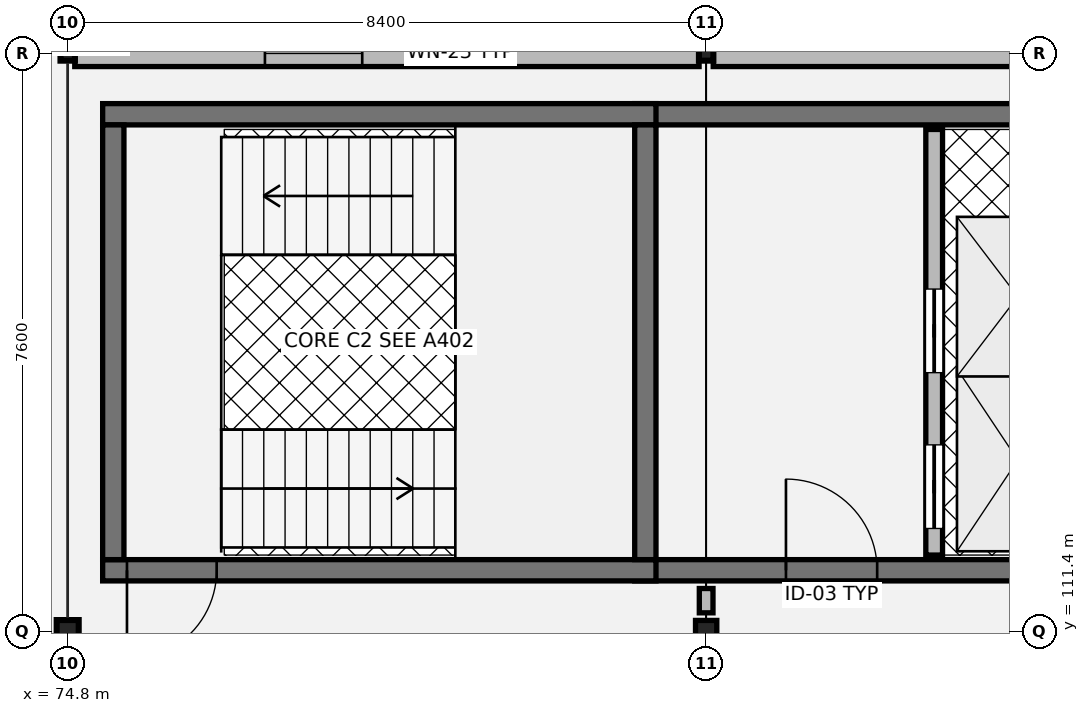
"""IFC4 building model, lengths in metres.
Left out: names, types, materials, properties, quantities, classifications, styles, units other than length and angle.
Written with IfcOpenShell. Run it as: python <this file> out.ifc"""

import sys

from ifc_helpers import new_model, si_unit, direction, frame, frame_2d, origin, origin_2d, place, context, subcontext, project, spatial, rectangle, hollow_rectangle, i_section, extrude, element, fill, save


model = new_model("IFC4")
c1 = context("Model", 3, precision=1e-05, world=origin(), true_north=direction((0.0, 1.0)))
c2 = subcontext(c1, "Body", "Model", "MODEL_VIEW")
j1 = project(units=[si_unit("LENGTHUNIT", "METRE"), si_unit("PLANEANGLEUNIT", "RADIAN")], contexts=[c1])
p1 = place(None, origin())
s1 = spatial("IfcSite", under=j1, at=p1, CompositionType="ELEMENT")
p2 = place(p1, origin())
s2 = spatial("IfcBuilding", under=s1, at=p2, CompositionType="ELEMENT")
p3 = place(p2, frame((0.0, 0.0, 21.42)))
s3 = spatial("IfcBuildingStorey", under=s2, at=p3, CompositionType="ELEMENT", Elevation=21.42)
p4 = place(p3, frame((74.8, 111.4, 0.0), z_axis=(0.0, 0.0, 1.0), x_axis=(1.0, 0.0, 0.0)))
e1 = element("IfcColumn", 1, at=p4, inside=s3, PredefinedType="COLUMN", context=c2, shape_type="SweptSolid", body=[
    extrude(i_section(OverallWidth=0.28, OverallDepth=0.28, WebThickness=0.01, FlangeThickness=0.018, at=origin_2d()), origin(), (0.0, 0.0, 1.0), 3.88),
])
p5 = place(p3, frame((74.8, 119.0, 0.0), z_axis=(0.0, 0.0, 1.0), x_axis=(1.0, 0.0, 0.0)))
e2 = element("IfcColumn", 2, at=p5, inside=s3, PredefinedType="COLUMN", context=c2, shape_type="SweptSolid", body=[
    extrude(hollow_rectangle(XDim=0.18, YDim=0.18, WallThickness=0.01, at=origin_2d()), origin(), (0.0, 0.0, 1.0), 3.88),
])
p6 = place(p3, frame((83.2, 111.4, 0.0), z_axis=(0.0, 0.0, 1.0), x_axis=(1.0, 0.0, 0.0)))
e3 = element("IfcColumn", 3, at=p6, inside=s3, PredefinedType="COLUMN", context=c2, shape_type="SweptSolid", body=[
    extrude(i_section(OverallWidth=0.28, OverallDepth=0.28, WebThickness=0.01, FlangeThickness=0.018, at=origin_2d()), origin(), (0.0, 0.0, 1.0), 3.88),
])
p7 = place(p3, frame((83.2, 119.0, 0.0), z_axis=(0.0, 0.0, 1.0), x_axis=(1.0, 0.0, 0.0)))
e4 = element("IfcColumn", 4, at=p7, inside=s3, PredefinedType="COLUMN", context=c2, shape_type="SweptSolid", body=[
    extrude(hollow_rectangle(XDim=0.18, YDim=0.18, WallThickness=0.01, at=origin_2d()), origin(), (0.0, 0.0, 1.0), 3.88),
])
p8 = place(p3, frame((91.507, 119.0, 0.0), z_axis=(0.0, 0.0, 1.0), x_axis=(-1.0, 0.0, 0.0)))
e5 = element("IfcWall", 5, at=p8, inside=s3, PredefinedType="SOLIDWALL", context=c2, shape_type="SweptSolid", body=[
    extrude(rectangle(XDim=8.214, YDim=0.345, at=frame_2d((4.107, 0.0))), origin(), (0.0, 0.0, 1.0), 3.48),
])
p9 = place(p3, frame((83.107, 119.0, 0.0), z_axis=(0.0, 0.0, 1.0), x_axis=(-1.0, 0.0, 0.0)))
e6 = element("IfcWall", 6, at=p9, inside=s3, PredefinedType="SOLIDWALL", context=c2, shape_type="SweptSolid", body=[
    extrude(rectangle(XDim=8.214, YDim=0.345, at=frame_2d((4.107, 0.0))), origin(), (0.0, 0.0, 1.0), 3.48),
])
p10 = place(p9, frame((2.502, 0.0, 0.8)))
e7 = element("IfcOpeningElement", 7, at=p10, cuts=e6, PredefinedType="OPENING", context=c2, shape_type="SweptSolid", body=[
    extrude(rectangle(XDim=1.28, YDim=2.08, at=frame_2d((0.64, 1.04))), frame((0.0, 0.182, 0.0), z_axis=(0.0, -1.0, 0.0), x_axis=(1.0, 0.0, 0.0)), (0.0, 0.0, 1.0), 0.365),
])
p11 = place(p9, frame((4.432, 0.0, 0.8)))
e8 = element("IfcOpeningElement", 8, at=p11, cuts=e6, PredefinedType="OPENING", context=c2, shape_type="SweptSolid", body=[
    extrude(rectangle(XDim=1.28, YDim=2.08, at=frame_2d((0.64, 1.04))), frame((0.0, 0.182, 0.0), z_axis=(0.0, -1.0, 0.0), x_axis=(1.0, 0.0, 0.0)), (0.0, 0.0, 1.0), 0.365),
])
p12 = place(p3, frame((82.26, 112.2, 0.0), z_axis=(0.0, 0.0, 1.0), x_axis=(1.0, 0.0, 0.0)))
e9 = element("IfcWall", 9, at=p12, inside=s3, PredefinedType="SHEAR", context=c2, shape_type="SweptSolid", body=[
    extrude(rectangle(XDim=6.33, YDim=0.28, at=frame_2d((3.165, 0.0))), origin(), (0.0, 0.0, 1.0), 3.845),
])
p13 = place(p12, frame((1.99, 0.0, 0.0)))
e10 = element("IfcOpeningElement", 10, at=p13, cuts=e9, PredefinedType="OPENING", context=c2, shape_type="SweptSolid", body=[
    extrude(rectangle(XDim=1.2, YDim=2.16, at=frame_2d((0.6, 1.08))), frame((0.0, 0.15, 0.0), z_axis=(0.0, -1.0, 0.0), x_axis=(1.0, 0.0, 0.0)), (0.0, 0.0, 1.0), 0.3),
])
p14 = place(p3, frame((88.59, 118.2, 0.0), z_axis=(0.0, 0.0, 1.0), x_axis=(-1.0, 0.0, 0.0)))
e11 = element("IfcWall", 11, at=p14, inside=s3, PredefinedType="SHEAR", context=c2, shape_type="SweptSolid", body=[
    extrude(rectangle(XDim=6.33, YDim=0.28, at=frame_2d((3.165, 0.0))), origin(), (0.0, 0.0, 1.0), 3.845),
])
p15 = place(p3, frame((86.2, 112.4, 0.0), z_axis=(0.0, 0.0, 1.0), x_axis=(0.0, 1.0, 0.0)))
e12 = element("IfcWall", 12, at=p15, inside=s3, PredefinedType="SOLIDWALL", context=c2, shape_type="SweptSolid", body=[
    extrude(rectangle(XDim=5.6, YDim=0.22, at=frame_2d((2.8, 0.0))), origin(), (0.0, 0.0, 1.0), 3.845),
])
p16 = place(p15, frame((0.35, 0.0, 0.0)))
e13 = element("IfcOpeningElement", 13, at=p16, cuts=e12, PredefinedType="OPENING", context=c2, shape_type="SweptSolid", body=[
    extrude(rectangle(XDim=1.1, YDim=2.15, at=frame_2d((0.55, 1.075))), frame((0.0, 0.12, 0.0), z_axis=(0.0, -1.0, 0.0), x_axis=(1.0, 0.0, 0.0)), (0.0, 0.0, 1.0), 0.24),
])
p17 = place(p15, frame((2.4, 0.0, 0.0)))
e14 = element("IfcOpeningElement", 14, at=p17, cuts=e12, PredefinedType="OPENING", context=c2, shape_type="SweptSolid", body=[
    extrude(rectangle(XDim=1.1, YDim=2.15, at=frame_2d((0.55, 1.075))), frame((0.0, 0.12, 0.0), z_axis=(0.0, -1.0, 0.0), x_axis=(1.0, 0.0, 0.0)), (0.0, 0.0, 1.0), 0.24),
])
p18 = place(p3, frame((75.26, 112.2, 0.0), z_axis=(0.0, 0.0, 1.0), x_axis=(1.0, 0.0, 0.0)))
e15 = element("IfcWall", 15, at=p18, inside=s3, PredefinedType="SHEAR", context=c2, shape_type="SweptSolid", body=[
    extrude(rectangle(XDim=7.28, YDim=0.28, at=frame_2d((3.64, 0.0))), origin(), (0.0, 0.0, 1.0), 3.845),
])
p19 = place(p18, frame((0.32, 0.0, 0.0)))
e16 = element("IfcOpeningElement", 16, at=p19, cuts=e15, PredefinedType="OPENING", context=c2, shape_type="SweptSolid", body=[
    extrude(rectangle(XDim=1.18, YDim=2.18, at=frame_2d((0.59, 1.09))), frame((0.0, 0.15, 0.0), z_axis=(0.0, -1.0, 0.0), x_axis=(1.0, 0.0, 0.0)), (0.0, 0.0, 1.0), 0.3),
])
p20 = place(p3, frame((75.26, 118.2, 0.0), z_axis=(0.0, 0.0, 1.0), x_axis=(1.0, 0.0, 0.0)))
e17 = element("IfcWall", 17, at=p20, inside=s3, PredefinedType="SHEAR", context=c2, shape_type="SweptSolid", body=[
    extrude(rectangle(XDim=7.28, YDim=0.28, at=frame_2d((3.64, 0.0))), origin(), (0.0, 0.0, 1.0), 3.845),
])
for number, where, z_axis, x_axis in (
    (18, (75.4, 112.34, 0.0), (0.0, 0.0, 1.0), (0.0, 1.0, 0.0)),
    (19, (82.4, 112.34, 0.0), (0.0, 0.0, 1.0), (0.0, 1.0, 0.0)),
):
    element("IfcWall", number, at=place(p3, frame(where, z_axis=z_axis, x_axis=x_axis)), inside=s3, PredefinedType="SHEAR", context=c2, shape_type="SweptSolid", body=[
        extrude(rectangle(XDim=5.72, YDim=0.28, at=frame_2d((2.86, 0.0))), origin(), (0.0, 0.0, 1.0), 3.845),
    ])
p21 = place(p3, frame((83.2, 111.64, 0.0), z_axis=(0.0, 0.0, 1.0), x_axis=(0.0, 1.0, 0.0)))
e20 = element("IfcWall", 20, at=p21, inside=s3, PredefinedType="PARTITIONING", context=c2, shape_type="SweptSolid", body=[
    extrude(rectangle(XDim=0.32, YDim=0.18, at=frame_2d((0.16, 0.0))), origin(), (0.0, 0.0, 1.0), 3.18),
])
p22 = place(p10, origin())
e21 = element("IfcWindow", 21, at=p22, inside=s3, PartitioningType="SINGLE_PANEL", PredefinedType="WINDOW", context=c2, shape_type="SweptSolid", body=[
    extrude(rectangle(XDim=1.28, YDim=2.08, at=frame_2d((0.64, 1.04))), frame((0.0, 0.03, 0.0), z_axis=(0.0, -1.0, 0.0), x_axis=(1.0, 0.0, 0.0)), (0.0, 0.0, 1.0), 0.06),
])
fill(e7, e21)
p23 = place(p11, origin())
e22 = element("IfcWindow", 22, at=p23, inside=s3, PartitioningType="SINGLE_PANEL", PredefinedType="WINDOW", context=c2, shape_type="SweptSolid", body=[
    extrude(rectangle(XDim=1.28, YDim=2.08, at=frame_2d((0.64, 1.04))), frame((0.0, 0.03, 0.0), z_axis=(0.0, -1.0, 0.0), x_axis=(1.0, 0.0, 0.0)), (0.0, 0.0, 1.0), 0.06),
])
fill(e8, e22)
p24 = place(p13, origin())
e23 = element("IfcDoor", 23, at=p24, inside=s3, OperationType="SINGLE_SWING_LEFT", PredefinedType="DOOR", context=c2, shape_type="SweptSolid", body=[
    extrude(rectangle(XDim=1.2, YDim=2.16, at=frame_2d((0.6, 1.08))), frame((0.0, 0.025, 0.0), z_axis=(0.0, -1.0, 0.0), x_axis=(1.0, 0.0, 0.0)), (0.0, 0.0, 1.0), 0.05),
])
fill(e10, e23)
p25 = place(p16, origin())
e24 = element("IfcDoor", 24, at=p25, inside=s3, OperationType="SLIDING_TO_LEFT", PredefinedType="DOOR", context=c2, shape_type="SweptSolid", body=[
    extrude(rectangle(XDim=1.1, YDim=2.15, at=frame_2d((0.55, 1.075))), frame((0.0, 0.025, 0.0), z_axis=(0.0, -1.0, 0.0), x_axis=(1.0, 0.0, 0.0)), (0.0, 0.0, 1.0), 0.05),
])
fill(e13, e24)
p26 = place(p17, origin())
e25 = element("IfcDoor", 25, at=p26, inside=s3, OperationType="SLIDING_TO_LEFT", PredefinedType="DOOR", context=c2, shape_type="SweptSolid", body=[
    extrude(rectangle(XDim=1.1, YDim=2.15, at=frame_2d((0.55, 1.075))), frame((0.0, 0.025, 0.0), z_axis=(0.0, -1.0, 0.0), x_axis=(1.0, 0.0, 0.0)), (0.0, 0.0, 1.0), 0.05),
])
fill(e14, e25)
p27 = place(p19, origin())
e26 = element("IfcDoor", 26, at=p27, inside=s3, OperationType="SINGLE_SWING_RIGHT", PredefinedType="DOOR", context=c2, shape_type="SweptSolid", body=[
    extrude(rectangle(XDim=1.18, YDim=2.18, at=frame_2d((0.59, 1.09))), frame((0.0, 0.025, 0.0), z_axis=(0.0, -1.0, 0.0), x_axis=(1.0, 0.0, 0.0)), (0.0, 0.0, 1.0), 0.05),
])
fill(e16, e26)
save(model, sys.argv[1])
